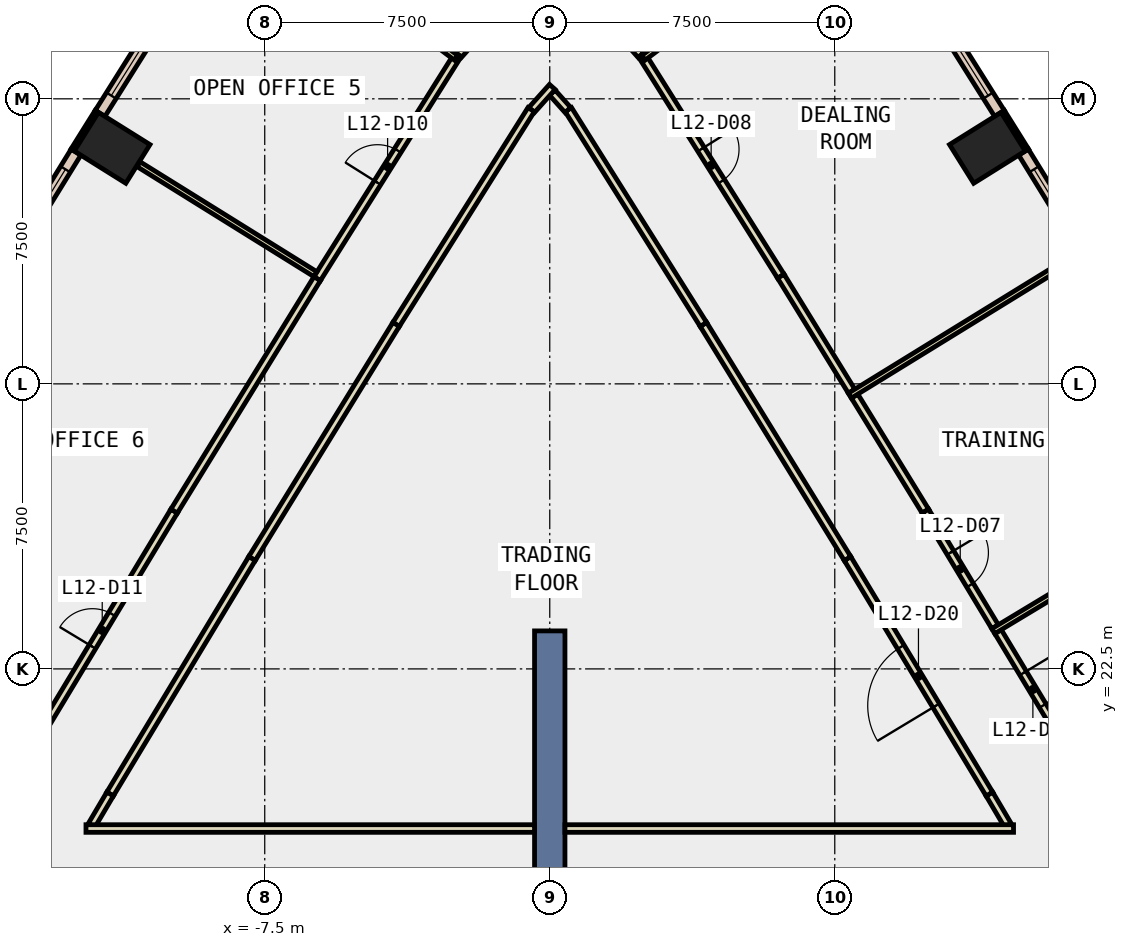
"""IFC4 building model, lengths in metres.
Left out: names, types, materials, properties, quantities, classifications, styles, units other than length and angle.
Written with IfcOpenShell. Run it as: python <this file> out.ifc"""

import sys

from ifc_helpers import new_model, si_unit, direction, frame, frame_2d, origin, origin_2d, place, context, subcontext, project, spatial, rectangle, extrude, element, fill, save


model = new_model("IFC4")
c1 = context("Model", 3, precision=1e-05, world=origin(), true_north=direction((0.0, 1.0)))
c2 = subcontext(c1, "Body", "Model", "MODEL_VIEW")
j1 = project(units=[si_unit("LENGTHUNIT", "METRE"), si_unit("PLANEANGLEUNIT", "RADIAN")], contexts=[c1])
p1 = place(None, origin())
s1 = spatial("IfcSite", under=j1, at=p1, CompositionType="ELEMENT")
p2 = place(p1, origin())
s2 = spatial("IfcBuilding", under=s1, at=p2, CompositionType="ELEMENT")
p3 = place(p2, frame((0.0, 0.0, 60.2)))
s3 = spatial("IfcBuildingStorey", under=s2, at=p3, CompositionType="ELEMENT", Elevation=60.2)
for number, where, z_axis, x_axis in (
    (1, (11.516, 36.211, -0.4), (0.0, 0.0, 1.0), (-0.53, 0.848, 0.0)),
    (2, (-11.516, 36.211, -0.4), (0.0, 0.0, 1.0), (0.53, 0.848, 0.0)),
):
    element("IfcColumn", number, at=place(p3, frame(where, z_axis=z_axis, x_axis=x_axis)), inside=s3, PredefinedType="COLUMN", context=c2, shape_type="SweptSolid", body=[
        extrude(rectangle(XDim=1.2, YDim=1.6, at=origin_2d()), origin(), (0.0, 0.0, 1.0), 4.2),
    ])
p4 = place(p3, frame((0.0, 14.5, -0.4), z_axis=(0.0, 0.0, 1.0), x_axis=(0.0, 1.0, 0.0)))
e3 = element("IfcWall", 3, at=p4, inside=s3, PredefinedType="SHEAR", context=c2, shape_type="SweptSolid", body=[
    extrude(rectangle(XDim=9.0, YDim=0.8, at=frame_2d((4.5, 0.0))), origin(), (0.0, 0.0, 1.0), 4.2),
])
for number, where, z_axis, x_axis in (
    (4, (12.555, 36.153, 0.0), (0.0, 0.0, 1.0), (-0.53, 0.848, 0.0)),
    (5, (-11.919, 37.17, 0.0), (0.0, 0.0, 1.0), (-0.53, -0.848, 0.0)),
):
    element("IfcWall", number, at=place(p3, frame(where, z_axis=z_axis, x_axis=x_axis)), inside=s3, PredefinedType="STANDARD", context=c2, shape_type="SweptSolid", body=[
        extrude(rectangle(XDim=1.199, YDim=0.1, at=frame_2d((0.6, 0.0))), origin(), (0.0, 0.0, 1.0), 3.8),
    ])
p5 = place(p3, frame((15.677, 30.882, 0.0), z_axis=(0.0, 0.0, 1.0), x_axis=(-0.524239751329, 0.851570715282, 0.0)))
e6 = element("IfcWall", 6, at=p5, inside=s3, PredefinedType="STANDARD", context=c2, shape_type="SweptSolid", body=[
    extrude(rectangle(XDim=6.125, YDim=0.3, at=frame_2d((3.062, 0.0))), origin(), (0.0, 0.0, 1.0), 3.8),
])
p6 = place(p5, frame((0.531, 0.0, 0.9)))
e7 = element("IfcOpeningElement", 7, at=p6, cuts=e6, PredefinedType="OPENING", context=c2, shape_type="SweptSolid", body=[
    extrude(rectangle(XDim=2.0, YDim=2.6, at=frame_2d((1.0, 1.3))), frame((0.0, 0.16, 0.0), z_axis=(0.0, -1.0, 0.0), x_axis=(1.0, 0.0, 0.0)), (0.0, 0.0, 1.0), 0.32),
])
p7 = place(p5, frame((3.594, 0.0, 0.9)))
e8 = element("IfcOpeningElement", 8, at=p7, cuts=e6, PredefinedType="OPENING", context=c2, shape_type="SweptSolid", body=[
    extrude(rectangle(XDim=2.0, YDim=2.6, at=frame_2d((1.0, 1.3))), frame((0.0, 0.16, 0.0), z_axis=(0.0, -1.0, 0.0), x_axis=(1.0, 0.0, 0.0)), (0.0, 0.0, 1.0), 0.32),
])
p8 = place(p3, frame((11.833, 37.116, 0.0), z_axis=(0.0, 0.0, 1.0), x_axis=(-0.532322705893, 0.846541515102, 0.0)))
e9 = element("IfcWall", 9, at=p8, inside=s3, PredefinedType="STANDARD", context=c2, shape_type="SweptSolid", body=[
    extrude(rectangle(XDim=6.218, YDim=0.3, at=frame_2d((3.109, 0.0))), origin(), (0.0, 0.0, 1.0), 3.8),
])
p9 = place(p8, frame((0.555, 0.0, 0.9)))
e10 = element("IfcOpeningElement", 10, at=p9, cuts=e9, PredefinedType="OPENING", context=c2, shape_type="SweptSolid", body=[
    extrude(rectangle(XDim=2.0, YDim=2.6, at=frame_2d((1.0, 1.3))), frame((0.0, 0.16, 0.0), z_axis=(0.0, -1.0, 0.0), x_axis=(1.0, 0.0, 0.0)), (0.0, 0.0, 1.0), 0.32),
])
p10 = place(p8, frame((3.664, 0.0, 0.9)))
e11 = element("IfcOpeningElement", 11, at=p10, cuts=e9, PredefinedType="OPENING", context=c2, shape_type="SweptSolid", body=[
    extrude(rectangle(XDim=2.0, YDim=2.6, at=frame_2d((1.0, 1.3))), frame((0.0, 0.16, 0.0), z_axis=(0.0, -1.0, 0.0), x_axis=(1.0, 0.0, 0.0)), (0.0, 0.0, 1.0), 0.32),
])
p11 = place(p3, frame((-8.523, 42.38, 0.0), z_axis=(0.0, 0.0, 1.0), x_axis=(-0.532322705893, -0.846541515102, 0.0)))
e12 = element("IfcWall", 12, at=p11, inside=s3, PredefinedType="STANDARD", context=c2, shape_type="SweptSolid", body=[
    extrude(rectangle(XDim=6.218, YDim=0.3, at=frame_2d((3.109, 0.0))), origin(), (0.0, 0.0, 1.0), 3.8),
])
p12 = place(p11, frame((0.555, 0.0, 0.9)))
e13 = element("IfcOpeningElement", 13, at=p12, cuts=e12, PredefinedType="OPENING", context=c2, shape_type="SweptSolid", body=[
    extrude(rectangle(XDim=2.0, YDim=2.6, at=frame_2d((1.0, 1.3))), frame((0.0, 0.16, 0.0), z_axis=(0.0, -1.0, 0.0), x_axis=(1.0, 0.0, 0.0)), (0.0, 0.0, 1.0), 0.32),
])
p13 = place(p11, frame((3.664, 0.0, 0.9)))
e14 = element("IfcOpeningElement", 14, at=p13, cuts=e12, PredefinedType="OPENING", context=c2, shape_type="SweptSolid", body=[
    extrude(rectangle(XDim=2.0, YDim=2.6, at=frame_2d((1.0, 1.3))), frame((0.0, 0.16, 0.0), z_axis=(0.0, -1.0, 0.0), x_axis=(1.0, 0.0, 0.0)), (0.0, 0.0, 1.0), 0.32),
])
p14 = place(p3, frame((-12.466, 36.098, 0.0), z_axis=(0.0, 0.0, 1.0), x_axis=(-0.524239751329, -0.851570715282, 0.0)))
e15 = element("IfcWall", 15, at=p14, inside=s3, PredefinedType="STANDARD", context=c2, shape_type="SweptSolid", body=[
    extrude(rectangle(XDim=6.125, YDim=0.3, at=frame_2d((3.062, 0.0))), origin(), (0.0, 0.0, 1.0), 3.8),
])
p15 = place(p14, frame((0.531, 0.0, 0.9)))
e16 = element("IfcOpeningElement", 16, at=p15, cuts=e15, PredefinedType="OPENING", context=c2, shape_type="SweptSolid", body=[
    extrude(rectangle(XDim=2.0, YDim=2.6, at=frame_2d((1.0, 1.3))), frame((0.0, 0.16, 0.0), z_axis=(0.0, -1.0, 0.0), x_axis=(1.0, 0.0, 0.0)), (0.0, 0.0, 1.0), 0.32),
])
p16 = place(p14, frame((3.594, 0.0, 0.9)))
e17 = element("IfcOpeningElement", 17, at=p16, cuts=e15, PredefinedType="OPENING", context=c2, shape_type="SweptSolid", body=[
    extrude(rectangle(XDim=2.0, YDim=2.6, at=frame_2d((1.0, 1.3))), frame((0.0, 0.16, 0.0), z_axis=(0.0, -1.0, 0.0), x_axis=(1.0, 0.0, 0.0)), (0.0, 0.0, 1.0), 0.32),
])
p17 = place(p3, frame((12.054, 18.386, 0.0), z_axis=(0.0, 0.0, 1.0), x_axis=(-0.508048285953, 0.861328589529, 0.0)))
e18 = element("IfcWall", 18, at=p17, inside=s3, PredefinedType="PARTITIONING", context=c2, shape_type="SweptSolid", body=[
    extrude(rectangle(XDim=0.954, YDim=0.2, at=frame_2d((0.477, 0.0))), origin(), (0.0, 0.0, 1.0), 3.8),
])
p18 = place(p3, frame((11.569, 19.208, 0.0), z_axis=(0.0, 0.0, 1.0), x_axis=(-0.516172233954, 0.85648480716, 0.0)))
e19 = element("IfcWall", 19, at=p18, inside=s3, PredefinedType="PARTITIONING", context=c2, shape_type="SweptSolid", body=[
    extrude(rectangle(XDim=7.234, YDim=0.2, at=frame_2d((3.617, 0.0))), origin(), (0.0, 0.0, 1.0), 3.8),
])
p19 = place(p18, frame((2.717, 0.0, 0.0)))
e20 = element("IfcOpeningElement", 20, at=p19, cuts=e19, PredefinedType="OPENING", context=c2, shape_type="SweptSolid", body=[
    extrude(rectangle(XDim=1.8, YDim=2.1, at=frame_2d((0.9, 1.05))), frame((0.0, 0.11, 0.0), z_axis=(0.0, -1.0, 0.0), x_axis=(1.0, 0.0, 0.0)), (0.0, 0.0, 1.0), 0.22),
])
p20 = place(p3, frame((7.835, 25.404, 0.0), z_axis=(0.0, 0.0, 1.0), x_axis=(-0.524225471951, 0.851579505717, 0.0)))
e21 = element("IfcWall", 21, at=p20, inside=s3, PredefinedType="PARTITIONING", context=c2, shape_type="SweptSolid", body=[
    extrude(rectangle(XDim=7.233, YDim=0.2, at=frame_2d((3.617, 0.0))), origin(), (0.0, 0.0, 1.0), 3.8),
])
p21 = place(p3, frame((4.043, 31.564, 0.0), z_axis=(0.0, 0.0, 1.0), x_axis=(-0.532301094997, 0.846555104092, 0.0)))
e22 = element("IfcWall", 22, at=p21, inside=s3, PredefinedType="PARTITIONING", context=c2, shape_type="SweptSolid", body=[
    extrude(rectangle(XDim=6.677, YDim=0.2, at=frame_2d((3.338, 0.0))), origin(), (0.0, 0.0, 1.0), 3.8),
])
p22 = place(p3, frame((0.476, 37.206, 0.0), z_axis=(0.0, 0.0, 1.0), x_axis=(-0.667027496744, 0.745033098988, 0.0)))
e23 = element("IfcWall", 23, at=p22, inside=s3, PredefinedType="PARTITIONING", context=c2, shape_type="SweptSolid", body=[
    extrude(rectangle(XDim=0.614, YDim=0.2, at=frame_2d((0.307, 0.0))), origin(), (0.0, 0.0, 1.0), 3.8),
])
p23 = place(p3, frame((0.067, 37.812, 0.0), z_axis=(0.0, 0.0, 1.0), x_axis=(-0.667338487106, -0.744754552606, 0.0)))
e24 = element("IfcWall", 24, at=p23, inside=s3, PredefinedType="PARTITIONING", context=c2, shape_type="SweptSolid", body=[
    extrude(rectangle(XDim=0.814, YDim=0.2, at=frame_2d((0.407, 0.0))), origin(), (0.0, 0.0, 1.0), 3.8),
])
p24 = place(p3, frame((-0.489, 37.216, 0.0), z_axis=(0.0, 0.0, 1.0), x_axis=(-0.532301094997, -0.846555104092, 0.0)))
e25 = element("IfcWall", 25, at=p24, inside=s3, PredefinedType="PARTITIONING", context=c2, shape_type="SweptSolid", body=[
    extrude(rectangle(XDim=6.677, YDim=0.2, at=frame_2d((3.338, 0.0))), origin(), (0.0, 0.0, 1.0), 3.8),
])
p25 = place(p3, frame((-4.043, 31.564, 0.0), z_axis=(0.0, 0.0, 1.0), x_axis=(-0.524225471951, -0.851579505717, 0.0)))
e26 = element("IfcWall", 26, at=p25, inside=s3, PredefinedType="PARTITIONING", context=c2, shape_type="SweptSolid", body=[
    extrude(rectangle(XDim=7.233, YDim=0.2, at=frame_2d((3.617, 0.0))), origin(), (0.0, 0.0, 1.0), 3.8),
])
p26 = place(p3, frame((-7.835, 25.404, 0.0), z_axis=(0.0, 0.0, 1.0), x_axis=(-0.516172233954, -0.85648480716, 0.0)))
e27 = element("IfcWall", 27, at=p26, inside=s3, PredefinedType="PARTITIONING", context=c2, shape_type="SweptSolid", body=[
    extrude(rectangle(XDim=7.234, YDim=0.2, at=frame_2d((3.617, 0.0))), origin(), (0.0, 0.0, 1.0), 3.8),
])
p27 = place(p3, frame((-11.569, 19.208, 0.0), z_axis=(0.0, 0.0, 1.0), x_axis=(-0.508048285953, -0.861328589529, 0.0)))
e28 = element("IfcWall", 28, at=p27, inside=s3, PredefinedType="PARTITIONING", context=c2, shape_type="SweptSolid", body=[
    extrude(rectangle(XDim=0.954, YDim=0.2, at=frame_2d((0.477, 0.0))), origin(), (0.0, 0.0, 1.0), 3.8),
])
p28 = place(p3, frame((11.796, 23.481, 0.0), z_axis=(0.0, 0.0, 1.0), x_axis=(0.516070934647, -0.8565458484, 0.0)))
e29 = element("IfcWall", 29, at=p28, inside=s3, PredefinedType="PARTITIONING", context=c2, shape_type="SweptSolid", body=[
    extrude(rectangle(XDim=3.554, YDim=0.2, at=frame_2d((1.777, 0.0))), origin(), (0.0, 0.0, 1.0), 3.8),
])
p29 = place(p28, frame((1.277, 0.0, 0.0)))
e30 = element("IfcOpeningElement", 30, at=p29, cuts=e29, PredefinedType="OPENING", context=c2, shape_type="SweptSolid", body=[
    extrude(rectangle(XDim=1.0, YDim=2.1, at=frame_2d((0.5, 1.05))), frame((0.0, 0.11, 0.0), z_axis=(0.0, -1.0, 0.0), x_axis=(1.0, 0.0, 0.0)), (0.0, 0.0, 1.0), 0.22),
])
p30 = place(p3, frame((8.022, 29.678, 0.0), z_axis=(0.0, 0.0, 1.0), x_axis=(0.524093591744, -0.851660676029, 0.0)))
e31 = element("IfcWall", 31, at=p30, inside=s3, PredefinedType="PARTITIONING", context=c2, shape_type="SweptSolid", body=[
    extrude(rectangle(XDim=3.553, YDim=0.2, at=frame_2d((1.776, 0.0))), origin(), (0.0, 0.0, 1.0), 3.8),
])
p31 = place(p3, frame((9.884, 26.652, 0.0), z_axis=(0.0, 0.0, 1.0), x_axis=(0.516162051318, -0.856490943781, 0.0)))
e32 = element("IfcWall", 32, at=p31, inside=s3, PredefinedType="PARTITIONING", context=c2, shape_type="SweptSolid", body=[
    extrude(rectangle(XDim=3.553, YDim=0.2, at=frame_2d((1.777, 0.0))), origin(), (0.0, 0.0, 1.0), 3.8),
])
p32 = place(p31, frame((1.277, 0.0, 0.0)))
e33 = element("IfcOpeningElement", 33, at=p32, cuts=e32, PredefinedType="OPENING", context=c2, shape_type="SweptSolid", body=[
    extrude(rectangle(XDim=1.0, YDim=2.1, at=frame_2d((0.5, 1.05))), frame((0.0, 0.11, 0.0), z_axis=(0.0, -1.0, 0.0), x_axis=(1.0, 0.0, 0.0)), (0.0, 0.0, 1.0), 0.22),
])
p33 = place(p3, frame((2.413, 38.665, 0.0), z_axis=(0.0, 0.0, 1.0), x_axis=(0.532328273879, -0.846538013812, 0.0)))
e34 = element("IfcWall", 34, at=p33, inside=s3, PredefinedType="PARTITIONING", context=c2, shape_type="SweptSolid", body=[
    extrude(rectangle(XDim=6.89, YDim=0.2, at=frame_2d((3.445, 0.0))), origin(), (0.0, 0.0, 1.0), 3.8),
])
p34 = place(p33, frame((2.945, 0.0, 0.0)))
e35 = element("IfcOpeningElement", 35, at=p34, cuts=e34, PredefinedType="OPENING", context=c2, shape_type="SweptSolid", body=[
    extrude(rectangle(XDim=1.0, YDim=2.1, at=frame_2d((0.5, 1.05))), frame((0.0, 0.11, 0.0), z_axis=(0.0, -1.0, 0.0), x_axis=(1.0, 0.0, 0.0)), (0.0, 0.0, 1.0), 0.22),
])
p35 = place(p3, frame((6.081, 32.832, 0.0), z_axis=(0.0, 0.0, 1.0), x_axis=(0.524062922014, -0.851679548756, 0.0)))
e36 = element("IfcWall", 36, at=p35, inside=s3, PredefinedType="PARTITIONING", context=c2, shape_type="SweptSolid", body=[
    extrude(rectangle(XDim=3.553, YDim=0.2, at=frame_2d((1.777, 0.0))), origin(), (0.0, 0.0, 1.0), 3.8),
])
p36 = place(p3, frame((-2.4, 38.655, 0.0), z_axis=(0.0, 0.0, 1.0), x_axis=(0.666791730919, 0.745244112743, 0.0)))
e37 = element("IfcWall", 37, at=p36, inside=s3, PredefinedType="PARTITIONING", context=c2, shape_type="SweptSolid", body=[
    extrude(rectangle(XDim=2.281, YDim=0.2, at=frame_2d((1.141, 0.0))), origin(), (0.0, 0.0, 1.0), 3.8),
])
p37 = place(p36, frame((0.641, 0.0, 0.0)))
e38 = element("IfcOpeningElement", 38, at=p37, cuts=e37, PredefinedType="OPENING", context=c2, shape_type="SweptSolid", body=[
    extrude(rectangle(XDim=1.0, YDim=2.1, at=frame_2d((0.5, 1.05))), frame((0.0, 0.11, 0.0), z_axis=(0.0, -1.0, 0.0), x_axis=(1.0, 0.0, 0.0)), (0.0, 0.0, 1.0), 0.22),
])
p38 = place(p3, frame((0.879, 40.355, 0.0), z_axis=(0.0, 0.0, 1.0), x_axis=(0.666791730919, -0.745244112743, 0.0)))
e39 = element("IfcWall", 39, at=p38, inside=s3, PredefinedType="PARTITIONING", context=c2, shape_type="SweptSolid", body=[
    extrude(rectangle(XDim=2.281, YDim=0.2, at=frame_2d((1.141, 0.0))), origin(), (0.0, 0.0, 1.0), 3.8),
])
p39 = place(p3, frame((-6.121, 32.768, 0.0), z_axis=(0.0, 0.0, 1.0), x_axis=(0.532309351336, 0.846549912574, 0.0)))
e40 = element("IfcWall", 40, at=p39, inside=s3, PredefinedType="PARTITIONING", context=c2, shape_type="SweptSolid", body=[
    extrude(rectangle(XDim=6.966, YDim=0.2, at=frame_2d((3.483, 0.0))), origin(), (0.0, 0.0, 1.0), 3.8),
])
p40 = place(p39, frame((2.983, 0.0, 0.0)))
e41 = element("IfcOpeningElement", 41, at=p40, cuts=e40, PredefinedType="OPENING", context=c2, shape_type="SweptSolid", body=[
    extrude(rectangle(XDim=1.0, YDim=2.1, at=frame_2d((0.5, 1.05))), frame((0.0, 0.11, 0.0), z_axis=(0.0, -1.0, 0.0), x_axis=(1.0, 0.0, 0.0)), (0.0, 0.0, 1.0), 0.22),
])
p41 = place(p3, frame((-13.669, 20.373, 0.0), z_axis=(0.0, 0.0, 1.0), x_axis=(0.516247820136, 0.85643924957, 0.0)))
e42 = element("IfcWall", 42, at=p41, inside=s3, PredefinedType="PARTITIONING", context=c2, shape_type="SweptSolid", body=[
    extrude(rectangle(XDim=7.332, YDim=0.2, at=frame_2d((3.666, 0.0))), origin(), (0.0, 0.0, 1.0), 3.8),
])
p42 = place(p41, frame((3.166, 0.0, 0.0)))
e43 = element("IfcOpeningElement", 43, at=p42, cuts=e42, PredefinedType="OPENING", context=c2, shape_type="SweptSolid", body=[
    extrude(rectangle(XDim=1.0, YDim=2.1, at=frame_2d((0.5, 1.05))), frame((0.0, 0.11, 0.0), z_axis=(0.0, -1.0, 0.0), x_axis=(1.0, 0.0, 0.0)), (0.0, 0.0, 1.0), 0.22),
])
p43 = place(p3, frame((-9.884, 26.652, 0.0), z_axis=(0.0, 0.0, 1.0), x_axis=(0.524182788618, 0.851605779758, 0.0)))
e44 = element("IfcWall", 44, at=p43, inside=s3, PredefinedType="PARTITIONING", context=c2, shape_type="SweptSolid", body=[
    extrude(rectangle(XDim=7.18, YDim=0.2, at=frame_2d((3.59, 0.0))), origin(), (0.0, 0.0, 1.0), 3.8),
])
p44 = place(p3, frame((-12.204, 18.3, 0.0), z_axis=(0.0, 0.0, 1.0), x_axis=(1.0, 0.0, 0.0)))
e45 = element("IfcWall", 45, at=p44, inside=s3, PredefinedType="PARTITIONING", context=c2, shape_type="SweptSolid", body=[
    extrude(rectangle(XDim=11.804, YDim=0.2, at=frame_2d((5.902, 0.0))), origin(), (0.0, 0.0, 1.0), 3.8),
])
p45 = place(p3, frame((11.672, 23.493, 0.0), z_axis=(0.0, 0.0, 1.0), x_axis=(0.856462653555, 0.516208991656, 0.0)))
e46 = element("IfcWall", 46, at=p45, inside=s3, PredefinedType="PARTITIONING", context=c2, shape_type="SweptSolid", body=[
    extrude(rectangle(XDim=7.1, YDim=0.15, at=frame_2d((3.55, 0.0))), origin(), (0.0, 0.0, 1.0), 3.8),
])
p46 = place(p3, frame((7.897, 29.69, 0.0), z_axis=(0.0, 0.0, 1.0), x_axis=(0.851604009471, 0.524185664677, 0.0)))
e47 = element("IfcWall", 47, at=p46, inside=s3, PredefinedType="PARTITIONING", context=c2, shape_type="SweptSolid", body=[
    extrude(rectangle(XDim=7.101, YDim=0.15, at=frame_2d((3.55, 0.0))), origin(), (0.0, 0.0, 1.0), 3.8),
])
for number, where, z_axis, x_axis in (
    (48, (2.466, 38.58, 0.0), (0.0, 0.0, 1.0), (0.799, 0.602, 0.0)),
    (49, (-2.466, 38.58, 0.0), (0.0, 0.0, 1.0), (-0.799, 0.602, 0.0)),
):
    element("IfcWall", number, at=place(p3, frame(where, z_axis=z_axis, x_axis=x_axis)), inside=s3, PredefinedType="PARTITIONING", context=c2, shape_type="SweptSolid", body=[
        extrude(rectangle(XDim=5.605, YDim=0.15, at=frame_2d((2.802, 0.0))), origin(), (0.0, 0.0, 1.0), 3.8),
    ])
p47 = place(p3, frame((-6.166, 32.885, 0.0), z_axis=(0.0, 0.0, 1.0), x_axis=(-0.84915518202, 0.528143424506, 0.0)))
e50 = element("IfcWall", 50, at=p47, inside=s3, PredefinedType="PARTITIONING", context=c2, shape_type="SweptSolid", body=[
    extrude(rectangle(XDim=5.48, YDim=0.15, at=frame_2d((2.74, 0.0))), origin(), (0.0, 0.0, 1.0), 3.8),
])
p48 = place(p3, frame((0.4, 18.3, 0.0), z_axis=(0.0, 0.0, 1.0), x_axis=(1.0, 0.0, 0.0)))
e51 = element("IfcWall", 51, at=p48, inside=s3, PredefinedType="PARTITIONING", context=c2, shape_type="SweptSolid", body=[
    extrude(rectangle(XDim=11.804, YDim=0.2, at=frame_2d((5.902, 0.0))), origin(), (0.0, 0.0, 1.0), 3.8),
])
p49 = place(p7, origin())
e52 = element("IfcWindow", 52, at=p49, inside=s3, PartitioningType="SINGLE_PANEL", PredefinedType="WINDOW", context=c2, shape_type="SweptSolid", body=[
    extrude(rectangle(XDim=2.0, YDim=2.6, at=frame_2d((1.0, 1.3))), frame((0.0, 0.03, 0.0), z_axis=(0.0, -1.0, 0.0), x_axis=(1.0, 0.0, 0.0)), (0.0, 0.0, 1.0), 0.06),
])
fill(e8, e52)
p50 = place(p9, origin())
e53 = element("IfcWindow", 53, at=p50, inside=s3, PartitioningType="SINGLE_PANEL", PredefinedType="WINDOW", context=c2, shape_type="SweptSolid", body=[
    extrude(rectangle(XDim=2.0, YDim=2.6, at=frame_2d((1.0, 1.3))), frame((0.0, 0.03, 0.0), z_axis=(0.0, -1.0, 0.0), x_axis=(1.0, 0.0, 0.0)), (0.0, 0.0, 1.0), 0.06),
])
fill(e10, e53)
p51 = place(p13, origin())
e54 = element("IfcWindow", 54, at=p51, inside=s3, PartitioningType="SINGLE_PANEL", PredefinedType="WINDOW", context=c2, shape_type="SweptSolid", body=[
    extrude(rectangle(XDim=2.0, YDim=2.6, at=frame_2d((1.0, 1.3))), frame((0.0, 0.03, 0.0), z_axis=(0.0, -1.0, 0.0), x_axis=(1.0, 0.0, 0.0)), (0.0, 0.0, 1.0), 0.06),
])
fill(e14, e54)
p52 = place(p15, origin())
e55 = element("IfcWindow", 55, at=p52, inside=s3, PartitioningType="SINGLE_PANEL", PredefinedType="WINDOW", context=c2, shape_type="SweptSolid", body=[
    extrude(rectangle(XDim=2.0, YDim=2.6, at=frame_2d((1.0, 1.3))), frame((0.0, 0.03, 0.0), z_axis=(0.0, -1.0, 0.0), x_axis=(1.0, 0.0, 0.0)), (0.0, 0.0, 1.0), 0.06),
])
fill(e16, e55)
p53 = place(p29, origin())
e56 = element("IfcDoor", 56, at=p53, inside=s3, OperationType="SINGLE_SWING_LEFT", PredefinedType="DOOR", context=c2, shape_type="SweptSolid", body=[
    extrude(rectangle(XDim=1.0, YDim=2.1, at=frame_2d((0.5, 1.05))), frame((0.0, 0.025, 0.0), z_axis=(0.0, -1.0, 0.0), x_axis=(1.0, 0.0, 0.0)), (0.0, 0.0, 1.0), 0.05),
])
fill(e30, e56)
p54 = place(p32, origin())
e57 = element("IfcDoor", 57, at=p54, inside=s3, OperationType="SINGLE_SWING_LEFT", PredefinedType="DOOR", context=c2, shape_type="SweptSolid", body=[
    extrude(rectangle(XDim=1.0, YDim=2.1, at=frame_2d((0.5, 1.05))), frame((0.0, 0.025, 0.0), z_axis=(0.0, -1.0, 0.0), x_axis=(1.0, 0.0, 0.0)), (0.0, 0.0, 1.0), 0.05),
])
fill(e33, e57)
p55 = place(p34, origin())
e58 = element("IfcDoor", 58, at=p55, inside=s3, OperationType="SINGLE_SWING_LEFT", PredefinedType="DOOR", context=c2, shape_type="SweptSolid", body=[
    extrude(rectangle(XDim=1.0, YDim=2.1, at=frame_2d((0.5, 1.05))), frame((0.0, 0.025, 0.0), z_axis=(0.0, -1.0, 0.0), x_axis=(1.0, 0.0, 0.0)), (0.0, 0.0, 1.0), 0.05),
])
fill(e35, e58)
p56 = place(p40, origin())
e59 = element("IfcDoor", 59, at=p56, inside=s3, OperationType="SINGLE_SWING_LEFT", PredefinedType="DOOR", context=c2, shape_type="SweptSolid", body=[
    extrude(rectangle(XDim=1.0, YDim=2.1, at=frame_2d((0.5, 1.05))), frame((0.0, 0.025, 0.0), z_axis=(0.0, -1.0, 0.0), x_axis=(1.0, 0.0, 0.0)), (0.0, 0.0, 1.0), 0.05),
])
fill(e41, e59)
p57 = place(p42, origin())
e60 = element("IfcDoor", 60, at=p57, inside=s3, OperationType="SINGLE_SWING_LEFT", PredefinedType="DOOR", context=c2, shape_type="SweptSolid", body=[
    extrude(rectangle(XDim=1.0, YDim=2.1, at=frame_2d((0.5, 1.05))), frame((0.0, 0.025, 0.0), z_axis=(0.0, -1.0, 0.0), x_axis=(1.0, 0.0, 0.0)), (0.0, 0.0, 1.0), 0.05),
])
fill(e43, e60)
p58 = place(p19, origin())
e61 = element("IfcDoor", 61, at=p58, inside=s3, OperationType="DOUBLE_DOOR_SINGLE_SWING", PredefinedType="DOOR", context=c2, shape_type="SweptSolid", body=[
    extrude(rectangle(XDim=1.8, YDim=2.1, at=frame_2d((0.9, 1.05))), frame((0.0, 0.025, 0.0), z_axis=(0.0, -1.0, 0.0), x_axis=(1.0, 0.0, 0.0)), (0.0, 0.0, 1.0), 0.05),
])
fill(e20, e61)
save(model, sys.argv[1])
